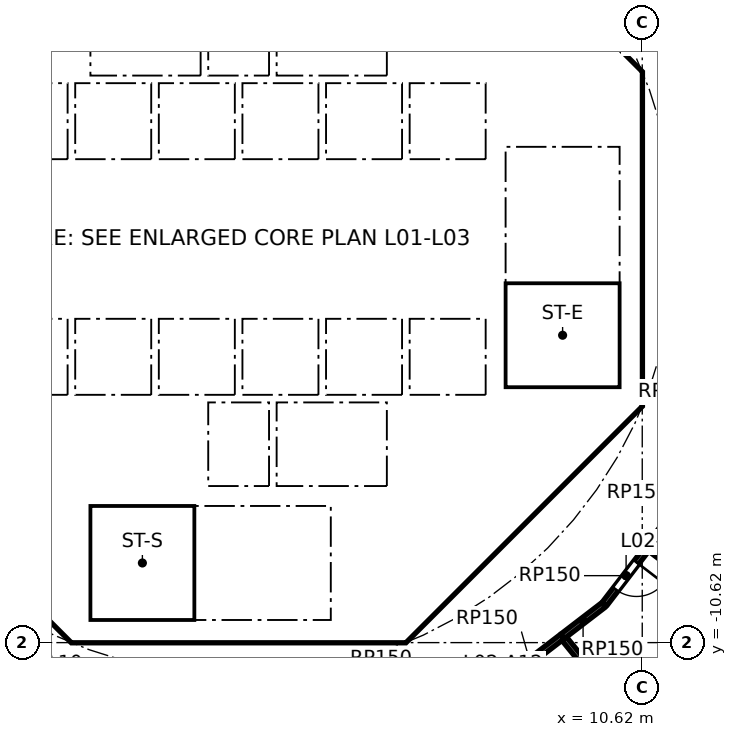
"""IFC4 building model, lengths in metres.
Left out: names, types, materials, properties, quantities, classifications, styles, units other than length and angle.
Written with IfcOpenShell. Run it as: python <this file> out.ifc"""

import sys

from ifc_helpers import new_model, si_unit, direction, frame, frame_2d, origin, place, context, subcontext, project, spatial, polyline, rectangle, outline, extrude, element, fill, save


model = new_model("IFC4")
c1 = context("Model", 3, precision=1e-05, world=origin(), true_north=direction((0.0, 1.0)))
c2 = subcontext(c1, "Body", "Model", "MODEL_VIEW")
j1 = project(units=[si_unit("LENGTHUNIT", "METRE"), si_unit("PLANEANGLEUNIT", "RADIAN")], contexts=[c1])
p1 = place(None, origin())
s1 = spatial("IfcSite", under=j1, at=p1, CompositionType="ELEMENT")
p2 = place(p1, origin())
s2 = spatial("IfcBuilding", under=s1, at=p2, CompositionType="ELEMENT")
p3 = place(p2, frame((0.0, 0.0, 12.0)))
s3 = spatial("IfcBuildingStorey", under=s2, at=p3, CompositionType="ELEMENT", Elevation=12.0)
p4 = place(p3, frame((9.988, 4.613, 0.0), z_axis=(0.0, 0.0, 1.0), x_axis=(-0.707106781187, 0.707106781187, 0.0)))
e1 = element("IfcWall", 1, at=p4, inside=s3, PredefinedType="SHEAR", context=c2, shape_type="SweptSolid", body=[
    extrude(rectangle(XDim=7.602, YDim=0.6, at=frame_2d((3.801, 0.0))), origin(), (0.0, 0.0, 1.0), 4.7),
])
p5 = place(p4, frame((3.201, 0.0, 0.0)))
e2 = element("IfcOpeningElement", 2, at=p5, cuts=e1, PredefinedType="OPENING", context=c2, shape_type="SweptSolid", body=[
    extrude(rectangle(XDim=1.2, YDim=2.1, at=frame_2d((0.6, 1.05))), frame((0.0, 0.31, 0.0), z_axis=(0.0, -1.0, 0.0), x_axis=(1.0, 0.0, 0.0)), (0.0, 0.0, 1.0), 0.62),
])
p6 = place(p3, frame((-4.613, 9.988, 0.0), z_axis=(0.0, 0.0, 1.0), x_axis=(-0.707106781187, -0.707106781187, 0.0)))
e3 = element("IfcWall", 3, at=p6, inside=s3, PredefinedType="SHEAR", context=c2, shape_type="SweptSolid", body=[
    extrude(rectangle(XDim=7.602, YDim=0.6, at=frame_2d((3.801, 0.0))), origin(), (0.0, 0.0, 1.0), 4.7),
])
p7 = place(p6, frame((0.351, 0.0, 0.0)))
e4 = element("IfcOpeningElement", 4, at=p7, cuts=e3, PredefinedType="OPENING", context=c2, shape_type="SweptSolid", body=[
    extrude(rectangle(XDim=1.1, YDim=2.1, at=frame_2d((0.55, 1.05))), frame((0.0, 0.31, 0.0), z_axis=(0.0, -1.0, 0.0), x_axis=(1.0, 0.0, 0.0)), (0.0, 0.0, 1.0), 0.62),
])
p8 = place(p3, frame((-9.988, -4.613, 0.0), z_axis=(0.0, 0.0, 1.0), x_axis=(0.707106781187, -0.707106781187, 0.0)))
e5 = element("IfcWall", 5, at=p8, inside=s3, PredefinedType="SHEAR", context=c2, shape_type="SweptSolid", body=[
    extrude(rectangle(XDim=7.602, YDim=0.6, at=frame_2d((3.801, 0.0))), origin(), (0.0, 0.0, 1.0), 4.7),
])
p9 = place(p8, frame((6.151, 0.0, 0.0)))
e6 = element("IfcOpeningElement", 6, at=p9, cuts=e5, PredefinedType="OPENING", context=c2, shape_type="SweptSolid", body=[
    extrude(rectangle(XDim=1.1, YDim=2.1, at=frame_2d((0.55, 1.05))), frame((0.0, 0.31, 0.0), z_axis=(0.0, -1.0, 0.0), x_axis=(1.0, 0.0, 0.0)), (0.0, 0.0, 1.0), 0.62),
])
p10 = place(p3, frame((4.613, -9.988, 0.0), z_axis=(0.0, 0.0, 1.0), x_axis=(0.707106781187, 0.707106781187, 0.0)))
e7 = element("IfcWall", 7, at=p10, inside=s3, PredefinedType="SHEAR", context=c2, shape_type="SweptSolid", body=[
    extrude(rectangle(XDim=7.602, YDim=0.6, at=frame_2d((3.801, 0.0))), origin(), (0.0, 0.0, 1.0), 4.7),
])
p11 = place(p10, frame((3.201, 0.0, 0.0)))
e8 = element("IfcOpeningElement", 8, at=p11, cuts=e7, PredefinedType="OPENING", context=c2, shape_type="SweptSolid", body=[
    extrude(rectangle(XDim=1.2, YDim=2.1, at=frame_2d((0.6, 1.05))), frame((0.0, 0.31, 0.0), z_axis=(0.0, -1.0, 0.0), x_axis=(1.0, 0.0, 0.0)), (0.0, 0.0, 1.0), 0.62),
])
p12 = place(p3, frame((4.0, 4.3, 0.0), z_axis=(0.0, 0.0, 1.0), x_axis=(0.0, 1.0, 0.0)))
e9 = element("IfcWall", 9, at=p12, inside=s3, PredefinedType="SOLIDWALL", context=c2, shape_type="SweptSolid", body=[
    extrude(rectangle(XDim=2.2, YDim=0.2, at=frame_2d((1.1, 0.0))), origin(), (0.0, 0.0, 1.0), 4.7),
])
p13 = place(p12, frame((0.55, 0.0, 0.0)))
e10 = element("IfcOpeningElement", 10, at=p13, cuts=e9, PredefinedType="OPENING", context=c2, shape_type="SweptSolid", body=[
    extrude(rectangle(XDim=1.1, YDim=2.1, at=frame_2d((0.55, 1.05))), frame((0.0, 0.11, 0.0), z_axis=(0.0, -1.0, 0.0), x_axis=(1.0, 0.0, 0.0)), (0.0, 0.0, 1.0), 0.22),
])
p14 = place(p3, frame((-4.0, 4.3, 0.0), z_axis=(0.0, 0.0, 1.0), x_axis=(0.0, 1.0, 0.0)))
e11 = element("IfcWall", 11, at=p14, inside=s3, PredefinedType="SOLIDWALL", context=c2, shape_type="SweptSolid", body=[
    extrude(rectangle(XDim=2.2, YDim=0.2, at=frame_2d((1.1, 0.0))), origin(), (0.0, 0.0, 1.0), 4.7),
])
p15 = place(p14, frame((0.55, 0.0, 0.0)))
e12 = element("IfcOpeningElement", 12, at=p15, cuts=e11, PredefinedType="OPENING", context=c2, shape_type="SweptSolid", body=[
    extrude(rectangle(XDim=1.1, YDim=2.1, at=frame_2d((0.55, 1.05))), frame((0.0, 0.11, 0.0), z_axis=(0.0, -1.0, 0.0), x_axis=(1.0, 0.0, 0.0)), (0.0, 0.0, 1.0), 0.22),
])
p16 = place(p3, frame((-6.7, 2.0, 0.0), z_axis=(0.0, 0.0, 1.0), x_axis=(1.0, 0.0, 0.0)))
e13 = element("IfcWall", 13, at=p16, inside=s3, PredefinedType="SOLIDWALL", context=c2, shape_type="SweptSolid", body=[
    extrude(rectangle(XDim=13.4, YDim=0.2, at=frame_2d((6.7, 0.0))), origin(), (0.0, 0.0, 1.0), 4.7),
])
p17 = place(p16, frame((0.65, 0.0, 0.0)))
e14 = element("IfcOpeningElement", 14, at=p17, cuts=e13, PredefinedType="OPENING", context=c2, shape_type="SweptSolid", body=[
    extrude(rectangle(XDim=1.1, YDim=2.1, at=frame_2d((0.55, 1.05))), frame((0.0, 0.11, 0.0), z_axis=(0.0, -1.0, 0.0), x_axis=(1.0, 0.0, 0.0)), (0.0, 0.0, 1.0), 0.22),
])
p18 = place(p16, frame((2.85, 0.0, 0.0)))
e15 = element("IfcOpeningElement", 15, at=p18, cuts=e13, PredefinedType="OPENING", context=c2, shape_type="SweptSolid", body=[
    extrude(rectangle(XDim=1.1, YDim=2.1, at=frame_2d((0.55, 1.05))), frame((0.0, 0.11, 0.0), z_axis=(0.0, -1.0, 0.0), x_axis=(1.0, 0.0, 0.0)), (0.0, 0.0, 1.0), 0.22),
])
p19 = place(p16, frame((5.05, 0.0, 0.0)))
e16 = element("IfcOpeningElement", 16, at=p19, cuts=e13, PredefinedType="OPENING", context=c2, shape_type="SweptSolid", body=[
    extrude(rectangle(XDim=1.1, YDim=2.1, at=frame_2d((0.55, 1.05))), frame((0.0, 0.11, 0.0), z_axis=(0.0, -1.0, 0.0), x_axis=(1.0, 0.0, 0.0)), (0.0, 0.0, 1.0), 0.22),
])
p20 = place(p3, frame((6.7, 4.0, 0.0), z_axis=(0.0, 0.0, 1.0), x_axis=(1.0, 0.0, 0.0)))
e17 = element("IfcWall", 17, at=p20, inside=s3, PredefinedType="SOLIDWALL", context=c2, shape_type="SweptSolid", body=[
    extrude(rectangle(XDim=3.325, YDim=0.2, at=frame_2d((1.662, 0.0))), origin(), (0.0, 0.0, 1.0), 4.7),
])
p21 = place(p20, frame((1.25, 0.0, 0.0)))
e18 = element("IfcOpeningElement", 18, at=p21, cuts=e17, PredefinedType="OPENING", context=c2, shape_type="SweptSolid", body=[
    extrude(rectangle(XDim=1.1, YDim=2.1, at=frame_2d((0.55, 1.05))), frame((0.0, 0.11, 0.0), z_axis=(0.0, -1.0, 0.0), x_axis=(1.0, 0.0, 0.0)), (0.0, 0.0, 1.0), 0.22),
])
p22 = place(p3, frame((4.0, -10.025, 0.0), z_axis=(0.0, 0.0, 1.0), x_axis=(0.0, 1.0, 0.0)))
e19 = element("IfcWall", 19, at=p22, inside=s3, PredefinedType="SOLIDWALL", context=c2, shape_type="SweptSolid", body=[
    extrude(rectangle(XDim=3.0, YDim=0.2, at=frame_2d((1.5, 0.0))), origin(), (0.0, 0.0, 1.0), 4.7),
])
p23 = place(p22, frame((0.975, 0.0, 0.0)))
e20 = element("IfcOpeningElement", 20, at=p23, cuts=e19, PredefinedType="OPENING", context=c2, shape_type="SweptSolid", body=[
    extrude(rectangle(XDim=1.1, YDim=2.1, at=frame_2d((0.55, 1.05))), frame((0.0, 0.11, 0.0), z_axis=(0.0, -1.0, 0.0), x_axis=(1.0, 0.0, 0.0)), (0.0, 0.0, 1.0), 0.22),
])
p24 = place(p3, frame((4.0, -6.5, 0.0), z_axis=(0.0, 0.0, 1.0), x_axis=(0.0, 1.0, 0.0)))
e21 = element("IfcWall", 21, at=p24, inside=s3, PredefinedType="SOLIDWALL", context=c2, shape_type="SweptSolid", body=[
    extrude(rectangle(XDim=2.2, YDim=0.2, at=frame_2d((1.1, 0.0))), origin(), (0.0, 0.0, 1.0), 4.7),
])
p25 = place(p24, frame((0.55, 0.0, 0.0)))
e22 = element("IfcOpeningElement", 22, at=p25, cuts=e21, PredefinedType="OPENING", context=c2, shape_type="SweptSolid", body=[
    extrude(rectangle(XDim=1.1, YDim=2.1, at=frame_2d((0.55, 1.05))), frame((0.0, 0.11, 0.0), z_axis=(0.0, -1.0, 0.0), x_axis=(1.0, 0.0, 0.0)), (0.0, 0.0, 1.0), 0.22),
])
p26 = place(p3, frame((-4.0, -6.5, 0.0), z_axis=(0.0, 0.0, 1.0), x_axis=(0.0, 1.0, 0.0)))
e23 = element("IfcWall", 23, at=p26, inside=s3, PredefinedType="SOLIDWALL", context=c2, shape_type="SweptSolid", body=[
    extrude(rectangle(XDim=2.2, YDim=0.2, at=frame_2d((1.1, 0.0))), origin(), (0.0, 0.0, 1.0), 4.7),
])
p27 = place(p26, frame((0.65, 0.0, 0.0)))
e24 = element("IfcOpeningElement", 24, at=p27, cuts=e23, PredefinedType="OPENING", context=c2, shape_type="SweptSolid", body=[
    extrude(rectangle(XDim=0.9, YDim=2.1, at=frame_2d((0.45, 1.05))), frame((0.0, 0.11, 0.0), z_axis=(0.0, -1.0, 0.0), x_axis=(1.0, 0.0, 0.0)), (0.0, 0.0, 1.0), 0.22),
])
p28 = place(p3, frame((-6.7, -2.0, 0.0), z_axis=(0.0, 0.0, 1.0), x_axis=(1.0, 0.0, 0.0)))
e25 = element("IfcWall", 25, at=p28, inside=s3, PredefinedType="SOLIDWALL", context=c2, shape_type="SweptSolid", body=[
    extrude(rectangle(XDim=13.4, YDim=0.2, at=frame_2d((6.7, 0.0))), origin(), (0.0, 0.0, 1.0), 4.7),
])
p29 = place(p28, frame((0.65, 0.0, 0.0)))
e26 = element("IfcOpeningElement", 26, at=p29, cuts=e25, PredefinedType="OPENING", context=c2, shape_type="SweptSolid", body=[
    extrude(rectangle(XDim=1.1, YDim=2.1, at=frame_2d((0.55, 1.05))), frame((0.0, 0.11, 0.0), z_axis=(0.0, -1.0, 0.0), x_axis=(1.0, 0.0, 0.0)), (0.0, 0.0, 1.0), 0.22),
])
p30 = place(p28, frame((2.85, 0.0, 0.0)))
e27 = element("IfcOpeningElement", 27, at=p30, cuts=e25, PredefinedType="OPENING", context=c2, shape_type="SweptSolid", body=[
    extrude(rectangle(XDim=1.1, YDim=2.1, at=frame_2d((0.55, 1.05))), frame((0.0, 0.11, 0.0), z_axis=(0.0, -1.0, 0.0), x_axis=(1.0, 0.0, 0.0)), (0.0, 0.0, 1.0), 0.22),
])
p31 = place(p3, origin())
e28 = element("IfcWall", 28, at=p31, inside=s3, PredefinedType="SHEAR", context=c2, shape_type="SweptSolid", body=[
    extrude(outline(polyline([(-4.152, -10.025), (4.152, -10.025), (4.401, -9.776), (4.825, -10.2), (4.401, -10.625), (-4.401, -10.625), (-4.825, -10.2), (-4.401, -9.776), (-4.152, -10.025)])), origin(), (0.0, 0.0, 1.0), 4.7),
])
p32 = place(p3, origin())
e29 = element("IfcWall", 29, at=p32, inside=s3, PredefinedType="SHEAR", context=c2, shape_type="SweptSolid", body=[
    extrude(outline(polyline([(9.776, -4.401), (10.025, -4.152), (10.025, -3.801), (10.025, 4.152), (9.776, 4.401), (10.2, 4.825), (10.625, 4.401), (10.625, -4.401), (10.2, -4.825), (9.776, -4.401)])), origin(), (0.0, 0.0, 1.0), 4.7),
])
for number, where, z_axis, x_axis in (
    (30, (-0.9, -6.5, 0.0), (0.0, 0.0, 1.0), (0.0, 1.0, 0.0)),
    (31, (0.9, -6.5, 0.0), (0.0, 0.0, 1.0), (0.0, 1.0, 0.0)),
):
    element("IfcWall", number, at=place(p3, frame(where, z_axis=z_axis, x_axis=x_axis)), inside=s3, PredefinedType="SOLIDWALL", context=c2, shape_type="SweptSolid", body=[
        extrude(rectangle(XDim=2.2, YDim=0.2, at=frame_2d((1.1, 0.0))), origin(), (0.0, 0.0, 1.0), 4.7),
    ])
p33 = place(p3, origin())
e32 = element("IfcWall", 32, at=p33, inside=s3, PredefinedType="SOLIDWALL", context=c2, shape_type="SweptSolid", body=[
    extrude(outline(polyline([(-6.7, -2.1), (-6.5, -2.1), (-6.5, -4.1), (-4.5, -4.1), (-4.5, -2.1), (-4.3, -2.1), (-4.3, -4.1), (-2.3, -4.1), (-2.3, -2.1), (-2.1, -2.1), (-2.1, -4.1), (-0.1, -4.1), (-0.1, -2.1), (0.1, -2.1), (0.1, -4.1), (2.1, -4.1), (2.1, -2.1), (2.3, -2.1), (2.3, -4.1), (4.3, -4.1), (4.3, -2.1), (4.5, -2.1), (4.5, -4.1), (6.5, -4.1), (6.5, -2.1), (6.7, -2.1), (6.7, -4.3), (-6.7, -4.3), (-6.7, -2.1)])), origin(), (0.0, 0.0, 1.0), 4.7),
])
for number, where, z_axis, x_axis in (
    (33, (-0.9, 4.3, 0.0), (0.0, 0.0, 1.0), (0.0, 1.0, 0.0)),
    (34, (0.9, 4.3, 0.0), (0.0, 0.0, 1.0), (0.0, 1.0, 0.0)),
):
    element("IfcWall", number, at=place(p3, frame(where, z_axis=z_axis, x_axis=x_axis)), inside=s3, PredefinedType="SOLIDWALL", context=c2, shape_type="SweptSolid", body=[
        extrude(rectangle(XDim=2.2, YDim=0.2, at=frame_2d((1.1, 0.0))), origin(), (0.0, 0.0, 1.0), 4.7),
    ])
p34 = place(p3, origin())
e35 = element("IfcWall", 35, at=p34, inside=s3, PredefinedType="SOLIDWALL", context=c2, shape_type="SweptSolid", body=[
    extrude(outline(polyline([(-6.5, 2.1), (-6.7, 2.1), (-6.7, 4.3), (6.7, 4.3), (6.7, 2.1), (6.5, 2.1), (6.5, 4.1), (4.5, 4.1), (4.5, 2.1), (4.3, 2.1), (4.3, 4.1), (2.3, 4.1), (2.3, 2.1), (2.1, 2.1), (2.1, 4.1), (0.1, 4.1), (0.1, 2.1), (-0.1, 2.1), (-0.1, 4.1), (-2.1, 4.1), (-2.1, 2.1), (-2.3, 2.1), (-2.3, 4.1), (-4.3, 4.1), (-4.3, 2.1), (-4.5, 2.1), (-4.5, 4.1), (-6.5, 4.1), (-6.5, 2.1)])), origin(), (0.0, 0.0, 1.0), 4.7),
])
p35 = place(p3, origin())
e36 = element("IfcWall", 36, at=p35, inside=s3, PredefinedType="SOLIDWALL", context=c2, shape_type="SweptSolid", body=[
    extrude(outline(polyline([(-3.9, -10.025), (-4.1, -10.025), (-4.1, -7.025), (-3.9, -7.025), (-3.9, -10.025)])), origin(), (0.0, 0.0, 1.0), 4.7),
])
p36 = place(p3, origin())
e37 = element("IfcWall", 37, at=p36, inside=s3, PredefinedType="SOLIDWALL", context=c2, shape_type="SweptSolid", body=[
    extrude(outline(polyline([(4.1, -7.025), (-4.1, -7.025), (-4.1, -6.5), (4.1, -6.5), (4.1, -7.025)])), origin(), (0.0, 0.0, 1.0), 4.7),
])
p37 = place(p3, origin())
e38 = element("IfcWall", 38, at=p37, inside=s3, PredefinedType="SOLIDWALL", context=c2, shape_type="SweptSolid", body=[
    extrude(outline(polyline([(7.025, -3.9), (6.7, -3.9), (6.7, 3.9), (7.025, 3.9), (7.025, -3.9)])), origin(), (0.0, 0.0, 1.0), 4.7),
])
p38 = place(p3, origin())
e39 = element("IfcWall", 39, at=p38, inside=s3, PredefinedType="SOLIDWALL", context=c2, shape_type="SweptSolid", body=[
    extrude(outline(polyline([(10.025, -4.1), (6.7, -4.1), (6.7, -3.9), (10.025, -3.9), (10.025, -4.1)])), origin(), (0.0, 0.0, 1.0), 4.7),
])
p39 = place(p3, frame((8.519, -10.459, 0.0), z_axis=(0.0, 0.0, 1.0), x_axis=(-0.793372937326, -0.608735888805, 0.0)))
e40 = element("IfcWall", 40, at=p39, inside=s3, PredefinedType="PARTITIONING", context=c2, shape_type="SweptSolid", body=[
    extrude(rectangle(XDim=2.155, YDim=0.15, at=frame_2d((1.078, 0.0))), origin(), (0.0, 0.0, 1.0), 4.7),
])
p40 = place(p3, frame((8.567, -10.517, 0.0), z_axis=(0.0, 0.0, 1.0), x_axis=(0.631550170727, -0.775335012658, 0.0)))
e41 = element("IfcWall", 41, at=p40, inside=s3, PredefinedType="PARTITIONING", context=c2, shape_type="SweptSolid", body=[
    extrude(rectangle(XDim=20.051, YDim=0.15, at=frame_2d((10.026, 0.0))), origin(), (0.0, 0.0, 1.0), 4.7),
])
p41 = place(p3, frame((9.607, -9.624, 0.0), z_axis=(0.0, 0.0, 1.0), x_axis=(-0.793371316762, -0.6087380009, 0.0)))
e42 = element("IfcWall", 42, at=p41, inside=s3, PredefinedType="PARTITIONING", context=c2, shape_type="SweptSolid", body=[
    extrude(rectangle(XDim=1.371, YDim=0.15, at=frame_2d((0.686, 0.0))), origin(), (0.0, 0.0, 1.0), 4.7),
])
p42 = place(p3, frame((10.774, -8.109, 0.0), z_axis=(0.0, 0.0, 1.0), x_axis=(-0.608754453805, -0.793358692504, 0.0)))
e43 = element("IfcWall", 43, at=p42, inside=s3, PredefinedType="PARTITIONING", context=c2, shape_type="SweptSolid", body=[
    extrude(rectangle(XDim=1.888, YDim=0.15, at=frame_2d((0.944, 0.0))), origin(), (0.0, 0.0, 1.0), 4.7),
])
p43 = place(p42, frame((0.5, 0.0, 0.0)))
e44 = element("IfcOpeningElement", 44, at=p43, cuts=e43, PredefinedType="OPENING", context=c2, shape_type="SweptSolid", body=[
    extrude(rectangle(XDim=0.9, YDim=2.1, at=frame_2d((0.45, 1.05))), frame((0.0, 0.085, 0.0), z_axis=(0.0, -1.0, 0.0), x_axis=(1.0, 0.0, 0.0)), (0.0, 0.0, 1.0), 0.17),
])
p44 = place(p3, frame((10.833, -8.154, 0.0), z_axis=(0.0, 0.0, 1.0), x_axis=(0.798984754133, -0.601351280586, 0.0)))
e45 = element("IfcWall", 45, at=p44, inside=s3, PredefinedType="PARTITIONING", context=c2, shape_type="SweptSolid", body=[
    extrude(rectangle(XDim=19.674, YDim=0.15, at=frame_2d((9.837, 0.0))), origin(), (0.0, 0.0, 1.0), 4.7),
])
p45 = place(p3, frame((11.771, -6.809, 0.0), z_axis=(0.0, 0.0, 1.0), x_axis=(-0.608716251771, -0.793388003961, 0.0)))
e46 = element("IfcWall", 46, at=p45, inside=s3, PredefinedType="PARTITIONING", context=c2, shape_type="SweptSolid", body=[
    extrude(rectangle(XDim=1.638, YDim=0.15, at=frame_2d((0.819, 0.0))), origin(), (0.0, 0.0, 1.0), 4.7),
])
p46 = place(p18, origin())
e47 = element("IfcDoor", 47, at=p46, inside=s3, OperationType="DOUBLE_DOOR_SLIDING", PredefinedType="DOOR", context=c2, shape_type="SweptSolid", body=[
    extrude(rectangle(XDim=1.1, YDim=2.1, at=frame_2d((0.55, 1.05))), frame((0.0, 0.025, 0.0), z_axis=(0.0, -1.0, 0.0), x_axis=(1.0, 0.0, 0.0)), (0.0, 0.0, 1.0), 0.05),
])
fill(e15, e47)
p47 = place(p19, origin())
e48 = element("IfcDoor", 48, at=p47, inside=s3, OperationType="DOUBLE_DOOR_SLIDING", PredefinedType="DOOR", context=c2, shape_type="SweptSolid", body=[
    extrude(rectangle(XDim=1.1, YDim=2.1, at=frame_2d((0.55, 1.05))), frame((0.0, 0.025, 0.0), z_axis=(0.0, -1.0, 0.0), x_axis=(1.0, 0.0, 0.0)), (0.0, 0.0, 1.0), 0.05),
])
fill(e16, e48)
p48 = place(p30, origin())
e49 = element("IfcDoor", 49, at=p48, inside=s3, OperationType="DOUBLE_DOOR_SLIDING", PredefinedType="DOOR", context=c2, shape_type="SweptSolid", body=[
    extrude(rectangle(XDim=1.1, YDim=2.1, at=frame_2d((0.55, 1.05))), frame((0.0, 0.025, 0.0), z_axis=(0.0, -1.0, 0.0), x_axis=(1.0, 0.0, 0.0)), (0.0, 0.0, 1.0), 0.05),
])
fill(e27, e49)
p49 = place(p13, origin())
e50 = element("IfcDoor", 50, at=p49, inside=s3, OperationType="DOUBLE_DOOR_SLIDING", PredefinedType="DOOR", context=c2, shape_type="SweptSolid", body=[
    extrude(rectangle(XDim=1.1, YDim=2.1, at=frame_2d((0.55, 1.05))), frame((0.0, 0.025, 0.0), z_axis=(0.0, -1.0, 0.0), x_axis=(1.0, 0.0, 0.0)), (0.0, 0.0, 1.0), 0.05),
])
fill(e10, e50)
p50 = place(p25, origin())
e51 = element("IfcDoor", 51, at=p50, inside=s3, OperationType="DOUBLE_DOOR_SLIDING", PredefinedType="DOOR", context=c2, shape_type="SweptSolid", body=[
    extrude(rectangle(XDim=1.1, YDim=2.1, at=frame_2d((0.55, 1.05))), frame((0.0, 0.025, 0.0), z_axis=(0.0, -1.0, 0.0), x_axis=(1.0, 0.0, 0.0)), (0.0, 0.0, 1.0), 0.05),
])
fill(e22, e51)
p51 = place(p15, origin())
e52 = element("IfcDoor", 52, at=p51, inside=s3, OperationType="DOUBLE_DOOR_SLIDING", PredefinedType="DOOR", context=c2, shape_type="SweptSolid", body=[
    extrude(rectangle(XDim=1.1, YDim=2.1, at=frame_2d((0.55, 1.05))), frame((0.0, 0.025, 0.0), z_axis=(0.0, -1.0, 0.0), x_axis=(1.0, 0.0, 0.0)), (0.0, 0.0, 1.0), 0.05),
])
fill(e12, e52)
p52 = place(p21, frame((1.1, 0.0, 0.0), x_axis=(-1.0, 0.0, 0.0)))
e53 = element("IfcDoor", 53, at=p52, inside=s3, OperationType="SINGLE_SWING_LEFT", PredefinedType="DOOR", context=c2, shape_type="SweptSolid", body=[
    extrude(rectangle(XDim=1.1, YDim=2.1, at=frame_2d((0.55, 1.05))), frame((0.0, 0.025, 0.0), z_axis=(0.0, -1.0, 0.0), x_axis=(1.0, 0.0, 0.0)), (0.0, 0.0, 1.0), 0.05),
])
fill(e18, e53)
p53 = place(p23, origin())
e54 = element("IfcDoor", 54, at=p53, inside=s3, OperationType="SINGLE_SWING_LEFT", PredefinedType="DOOR", context=c2, shape_type="SweptSolid", body=[
    extrude(rectangle(XDim=1.1, YDim=2.1, at=frame_2d((0.55, 1.05))), frame((0.0, 0.025, 0.0), z_axis=(0.0, -1.0, 0.0), x_axis=(1.0, 0.0, 0.0)), (0.0, 0.0, 1.0), 0.05),
])
fill(e20, e54)
p54 = place(p27, frame((0.9, 0.0, 0.0), x_axis=(-1.0, 0.0, 0.0)))
e55 = element("IfcDoor", 55, at=p54, inside=s3, OperationType="SINGLE_SWING_LEFT", PredefinedType="DOOR", context=c2, shape_type="SweptSolid", body=[
    extrude(rectangle(XDim=0.9, YDim=2.1, at=frame_2d((0.45, 1.05))), frame((0.0, 0.025, 0.0), z_axis=(0.0, -1.0, 0.0), x_axis=(1.0, 0.0, 0.0)), (0.0, 0.0, 1.0), 0.05),
])
fill(e24, e55)
p55 = place(p11, origin())
e56 = element("IfcDoor", 56, at=p55, inside=s3, OperationType="SINGLE_SWING_RIGHT", PredefinedType="DOOR", context=c2, shape_type="SweptSolid", body=[
    extrude(rectangle(XDim=1.2, YDim=2.1, at=frame_2d((0.6, 1.05))), frame((0.0, 0.025, 0.0), z_axis=(0.0, -1.0, 0.0), x_axis=(1.0, 0.0, 0.0)), (0.0, 0.0, 1.0), 0.05),
])
fill(e8, e56)
p56 = place(p9, origin())
e57 = element("IfcDoor", 57, at=p56, inside=s3, OperationType="SINGLE_SWING_RIGHT", PredefinedType="DOOR", context=c2, shape_type="SweptSolid", body=[
    extrude(rectangle(XDim=1.1, YDim=2.1, at=frame_2d((0.55, 1.05))), frame((0.0, 0.025, 0.0), z_axis=(0.0, -1.0, 0.0), x_axis=(1.0, 0.0, 0.0)), (0.0, 0.0, 1.0), 0.05),
])
fill(e6, e57)
p57 = place(p43, origin())
e58 = element("IfcDoor", 58, at=p57, inside=s3, OperationType="SINGLE_SWING_LEFT", PredefinedType="DOOR", context=c2, shape_type="SweptSolid", body=[
    extrude(rectangle(XDim=0.9, YDim=2.1, at=frame_2d((0.45, 1.05))), frame((0.0, 0.025, 0.0), z_axis=(0.0, -1.0, 0.0), x_axis=(1.0, 0.0, 0.0)), (0.0, 0.0, 1.0), 0.05),
])
fill(e44, e58)
save(model, sys.argv[1])
